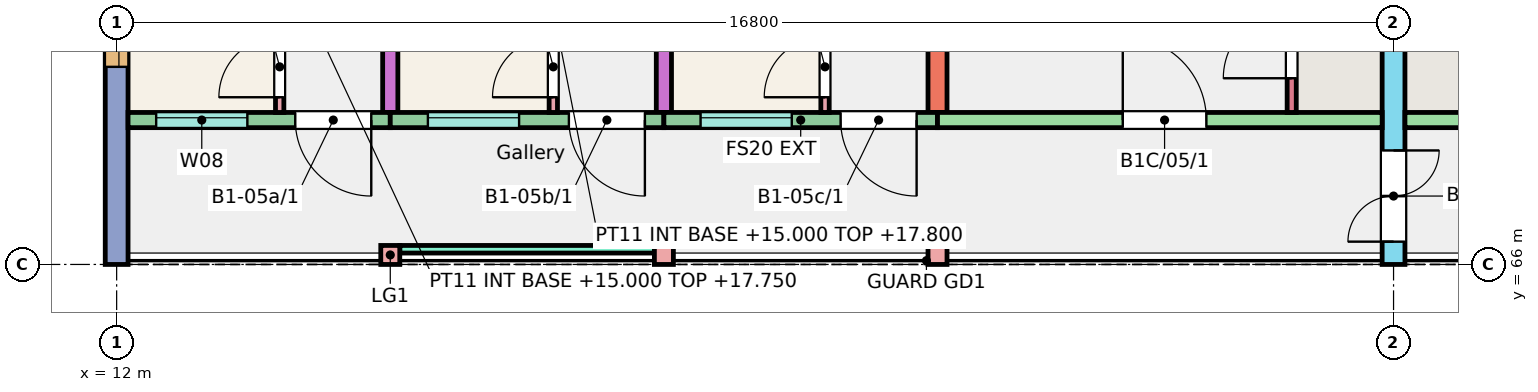
"""IFC4 building model, lengths in metres.
Left out: names, types, materials, properties, quantities, classifications, styles, units other than length and angle.
Written with IfcOpenShell. Run it as: python <this file> out.ifc"""

import sys

from ifc_helpers import new_model, si_unit, direction, frame, frame_2d, origin, origin_2d, place, context, subcontext, project, spatial, rectangle, extrude, element, fill, save


model = new_model("IFC4")
c1 = context("Model", 3, precision=1e-05, world=origin(), true_north=direction((0.0, 1.0)))
c2 = subcontext(c1, "Body", "Model", "MODEL_VIEW")
j1 = project(units=[si_unit("LENGTHUNIT", "METRE"), si_unit("PLANEANGLEUNIT", "RADIAN")], contexts=[c1])
p1 = place(None, origin())
s1 = spatial("IfcSite", under=j1, at=p1, CompositionType="ELEMENT")
p2 = place(p1, origin())
s2 = spatial("IfcBuilding", under=s1, at=p2, CompositionType="ELEMENT")
p3 = place(p2, frame((0.0, 0.0, 15.0)))
s3 = spatial("IfcBuildingStorey", under=s2, at=p3, CompositionType="ELEMENT", Elevation=15.0)
p4 = place(p3, frame((12.0, 66.0, 0.0), z_axis=(0.0, 0.0, 1.0), x_axis=(0.0, 1.0, 0.0)))
e1 = element("IfcWall", 1, at=p4, inside=s3, PredefinedType="SHEAR", context=c2, shape_type="SweptSolid", body=[
    extrude(rectangle(XDim=11.0, YDim=0.3, at=frame_2d((5.5, 0.0))), origin(), (0.0, 0.0, 1.0), 3.0),
])
p5 = place(p4, frame((2.6, 0.0, 0.9)))
e2 = element("IfcOpeningElement", 2, at=p5, cuts=e1, PredefinedType="OPENING", context=c2, shape_type="SweptSolid", body=[
    extrude(rectangle(XDim=1.2, YDim=1.5, at=frame_2d((0.6, 0.75))), frame((0.0, 0.16, 0.0), z_axis=(0.0, -1.0, 0.0), x_axis=(1.0, 0.0, 0.0)), (0.0, 0.0, 1.0), 0.32),
])
p6 = place(p4, frame((7.805, 0.0, 0.9)))
e3 = element("IfcOpeningElement", 3, at=p6, cuts=e1, PredefinedType="OPENING", context=c2, shape_type="SweptSolid", body=[
    extrude(rectangle(XDim=1.8, YDim=1.5, at=frame_2d((0.9, 0.75))), frame((0.0, 0.16, 0.0), z_axis=(0.0, -1.0, 0.0), x_axis=(1.0, 0.0, 0.0)), (0.0, 0.0, 1.0), 0.32),
])
for number, where, z_axis, x_axis in (
    (4, (15.6, 68.0, 0.0), (0.0, 0.0, 1.0), (0.0, 1.0, 0.0)),
    (5, (19.2, 68.0, 0.0), (0.0, 0.0, 1.0), (0.0, 1.0, 0.0)),
):
    element("IfcWall", number, at=place(p3, frame(where, z_axis=z_axis, x_axis=x_axis)), inside=s3, PredefinedType="SHEAR", context=c2, shape_type="SweptSolid", body=[
        extrude(rectangle(XDim=9.0, YDim=0.2, at=frame_2d((4.5, 0.0))), origin(), (0.0, 0.0, 1.0), 3.0),
    ])
p7 = place(p3, frame((22.8, 68.0, 0.0), z_axis=(0.0, 0.0, 1.0), x_axis=(0.0, 1.0, 0.0)))
e6 = element("IfcWall", 6, at=p7, inside=s3, PredefinedType="SHEAR", context=c2, shape_type="SweptSolid", body=[
    extrude(rectangle(XDim=9.0, YDim=0.25, at=frame_2d((4.5, 0.0))), origin(), (0.0, 0.0, 1.0), 3.0),
])
p8 = place(p3, frame((28.8, 66.0, 0.0), z_axis=(0.0, 0.0, 1.0), x_axis=(0.0, 1.0, 0.0)))
e7 = element("IfcWall", 7, at=p8, inside=s3, PredefinedType="SHEAR", context=c2, shape_type="SweptSolid", body=[
    extrude(rectangle(XDim=11.0, YDim=0.3, at=frame_2d((5.5, 0.0))), origin(), (0.0, 0.0, 1.0), 3.0),
])
p9 = place(p8, frame((0.3, 0.0, 0.0)))
e8 = element("IfcOpeningElement", 8, at=p9, cuts=e7, PredefinedType="OPENING", context=c2, shape_type="SweptSolid", body=[
    extrude(rectangle(XDim=1.2, YDim=2.1, at=frame_2d((0.6, 1.05))), frame((0.0, 0.16, 0.0), z_axis=(0.0, -1.0, 0.0), x_axis=(1.0, 0.0, 0.0)), (0.0, 0.0, 1.0), 0.32),
])
p10 = place(p3, frame((12.15, 67.9, 0.0), z_axis=(0.0, 0.0, 1.0), x_axis=(1.0, 0.0, 0.0)))
e9 = element("IfcWall", 9, at=p10, inside=s3, PredefinedType="SOLIDWALL", context=c2, shape_type="SweptSolid", body=[
    extrude(rectangle(XDim=3.45, YDim=0.2, at=frame_2d((1.725, 0.0))), origin(), (0.0, 0.0, 1.0), 3.0),
])
p11 = place(p10, frame((0.37, 0.0, 1.1)))
e10 = element("IfcOpeningElement", 10, at=p11, cuts=e9, PredefinedType="OPENING", context=c2, shape_type="SweptSolid", body=[
    extrude(rectangle(XDim=1.2, YDim=1.3, at=frame_2d((0.6, 0.65))), frame((0.0, 0.11, 0.0), z_axis=(0.0, -1.0, 0.0), x_axis=(1.0, 0.0, 0.0)), (0.0, 0.0, 1.0), 0.22),
])
p12 = place(p10, frame((2.2, 0.0, 0.0)))
e11 = element("IfcOpeningElement", 11, at=p12, cuts=e9, PredefinedType="OPENING", context=c2, shape_type="SweptSolid", body=[
    extrude(rectangle(XDim=1.0, YDim=2.1, at=frame_2d((0.5, 1.05))), frame((0.0, 0.11, 0.0), z_axis=(0.0, -1.0, 0.0), x_axis=(1.0, 0.0, 0.0)), (0.0, 0.0, 1.0), 0.22),
])
p13 = place(p3, frame((15.6, 67.9, 0.0), z_axis=(0.0, 0.0, 1.0), x_axis=(1.0, 0.0, 0.0)))
e12 = element("IfcWall", 12, at=p13, inside=s3, PredefinedType="SOLIDWALL", context=c2, shape_type="SweptSolid", body=[
    extrude(rectangle(XDim=3.6, YDim=0.2, at=frame_2d((1.8, 0.0))), origin(), (0.0, 0.0, 1.0), 3.0),
])
p14 = place(p13, frame((0.495, 0.0, 1.1)))
e13 = element("IfcOpeningElement", 13, at=p14, cuts=e12, PredefinedType="OPENING", context=c2, shape_type="SweptSolid", body=[
    extrude(rectangle(XDim=1.2, YDim=1.3, at=frame_2d((0.6, 0.65))), frame((0.0, 0.11, 0.0), z_axis=(0.0, -1.0, 0.0), x_axis=(1.0, 0.0, 0.0)), (0.0, 0.0, 1.0), 0.22),
])
p15 = place(p13, frame((2.35, 0.0, 0.0)))
e14 = element("IfcOpeningElement", 14, at=p15, cuts=e12, PredefinedType="OPENING", context=c2, shape_type="SweptSolid", body=[
    extrude(rectangle(XDim=1.0, YDim=2.1, at=frame_2d((0.5, 1.05))), frame((0.0, 0.11, 0.0), z_axis=(0.0, -1.0, 0.0), x_axis=(1.0, 0.0, 0.0)), (0.0, 0.0, 1.0), 0.22),
])
p16 = place(p3, frame((19.2, 67.9, 0.0), z_axis=(0.0, 0.0, 1.0), x_axis=(1.0, 0.0, 0.0)))
e15 = element("IfcWall", 15, at=p16, inside=s3, PredefinedType="SOLIDWALL", context=c2, shape_type="SweptSolid", body=[
    extrude(rectangle(XDim=3.6, YDim=0.2, at=frame_2d((1.8, 0.0))), origin(), (0.0, 0.0, 1.0), 3.0),
])
p17 = place(p16, frame((0.482, 0.0, 1.1)))
e16 = element("IfcOpeningElement", 16, at=p17, cuts=e15, PredefinedType="OPENING", context=c2, shape_type="SweptSolid", body=[
    extrude(rectangle(XDim=1.2, YDim=1.3, at=frame_2d((0.6, 0.65))), frame((0.0, 0.11, 0.0), z_axis=(0.0, -1.0, 0.0), x_axis=(1.0, 0.0, 0.0)), (0.0, 0.0, 1.0), 0.22),
])
p18 = place(p16, frame((2.325, 0.0, 0.0)))
e17 = element("IfcOpeningElement", 17, at=p18, cuts=e15, PredefinedType="OPENING", context=c2, shape_type="SweptSolid", body=[
    extrude(rectangle(XDim=1.0, YDim=2.1, at=frame_2d((0.5, 1.05))), frame((0.0, 0.11, 0.0), z_axis=(0.0, -1.0, 0.0), x_axis=(1.0, 0.0, 0.0)), (0.0, 0.0, 1.0), 0.22),
])
p19 = place(p3, frame((22.8, 67.9, 0.0), z_axis=(0.0, 0.0, 1.0), x_axis=(1.0, 0.0, 0.0)))
e18 = element("IfcWall", 18, at=p19, inside=s3, PredefinedType="SHEAR", context=c2, shape_type="SweptSolid", body=[
    extrude(rectangle(XDim=5.85, YDim=0.2, at=frame_2d((2.925, 0.0))), origin(), (0.0, 0.0, 1.0), 3.0),
])
p20 = place(p19, frame((2.438, 0.0, 0.0)))
e19 = element("IfcOpeningElement", 19, at=p20, cuts=e18, PredefinedType="OPENING", context=c2, shape_type="SweptSolid", body=[
    extrude(rectangle(XDim=1.1, YDim=2.1, at=frame_2d((0.55, 1.05))), frame((0.0, 0.11, 0.0), z_axis=(0.0, -1.0, 0.0), x_axis=(1.0, 0.0, 0.0)), (0.0, 0.0, 1.0), 0.22),
])
p21 = place(p3, frame((27.46, 68.0, 0.0), z_axis=(0.0, 0.0, 1.0), x_axis=(0.0, 1.0, 0.0)))
e20 = element("IfcWall", 20, at=p21, inside=s3, PredefinedType="SHEAR", context=c2, shape_type="SweptSolid", body=[
    extrude(rectangle(XDim=1.72, YDim=0.12, at=frame_2d((0.86, 0.0))), origin(), (0.0, 0.0, 1.0), 3.0),
])
p22 = place(p21, frame((0.45, 0.0, 0.0)))
e21 = element("IfcOpeningElement", 21, at=p22, cuts=e20, PredefinedType="OPENING", context=c2, shape_type="SweptSolid", body=[
    extrude(rectangle(XDim=0.9, YDim=2.1, at=frame_2d((0.45, 1.05))), frame((0.0, 0.07, 0.0), z_axis=(0.0, -1.0, 0.0), x_axis=(1.0, 0.0, 0.0)), (0.0, 0.0, 1.0), 0.14),
])
p23 = place(p3, frame((28.95, 67.9, 0.0), z_axis=(0.0, 0.0, 1.0), x_axis=(1.0, 0.0, 0.0)))
e22 = element("IfcWall", 22, at=p23, inside=s3, PredefinedType="SHEAR", context=c2, shape_type="SweptSolid", body=[
    extrude(rectangle(XDim=5.85, YDim=0.2, at=frame_2d((2.925, 0.0))), origin(), (0.0, 0.0, 1.0), 3.0),
])
p24 = place(p23, frame((2.312, 0.0, 0.0)))
e23 = element("IfcOpeningElement", 23, at=p24, cuts=e22, PredefinedType="OPENING", context=c2, shape_type="SweptSolid", body=[
    extrude(rectangle(XDim=1.1, YDim=2.1, at=frame_2d((0.55, 1.05))), frame((0.0, 0.11, 0.0), z_axis=(0.0, -1.0, 0.0), x_axis=(1.0, 0.0, 0.0)), (0.0, 0.0, 1.0), 0.22),
])
for number, where, z_axis, x_axis in (
    (24, (15.6, 66.125, 0.0), (0.0, 0.0, 1.0), (1.0, 0.0, 0.0)),
    (25, (19.2, 66.125, 0.0), (0.0, 0.0, 1.0), (1.0, 0.0, 0.0)),
    (26, (22.8, 66.125, 0.0), (0.0, 0.0, 1.0), (1.0, 0.0, 0.0)),
):
    element("IfcColumn", number, at=place(p3, frame(where, z_axis=z_axis, x_axis=x_axis)), inside=s3, PredefinedType="COLUMN", context=c2, shape_type="SweptSolid", body=[
        extrude(rectangle(XDim=0.25, YDim=0.25, at=origin_2d()), origin(), (0.0, 0.0, 1.0), 3.0),
    ])
p25 = place(p3, frame((15.725, 66.2, 0.0), z_axis=(0.0, 0.0, 1.0), x_axis=(1.0, 0.0, 0.0)))
e27 = element("IfcWall", 27, at=p25, inside=s3, PredefinedType="SOLIDWALL", context=c2, shape_type="SweptSolid", body=[
    extrude(rectangle(XDim=3.35, YDim=0.1, at=frame_2d((1.675, 0.0))), origin(), (0.0, 0.0, 1.0), 2.45),
])
p26 = place(p3, frame((14.145, 68.0, 0.0), z_axis=(0.0, 0.0, 1.0), x_axis=(0.0, 1.0, 0.0)))
e28 = element("IfcWall", 28, at=p26, inside=s3, PredefinedType="PARTITIONING", context=c2, shape_type="SweptSolid", body=[
    extrude(rectangle(XDim=4.3, YDim=0.11, at=frame_2d((2.15, 0.0))), origin(), (0.0, 0.0, 1.0), 2.75),
])
p27 = place(p26, frame((0.2, 0.0, 0.0)))
e29 = element("IfcOpeningElement", 29, at=p27, cuts=e28, PredefinedType="OPENING", context=c2, shape_type="SweptSolid", body=[
    extrude(rectangle(XDim=0.8, YDim=2.1, at=frame_2d((0.4, 1.05))), frame((0.0, 0.065, 0.0), z_axis=(0.0, -1.0, 0.0), x_axis=(1.0, 0.0, 0.0)), (0.0, 0.0, 1.0), 0.13),
])
p28 = place(p26, frame((3.35, 0.0, 0.0)))
e30 = element("IfcOpeningElement", 30, at=p28, cuts=e28, PredefinedType="OPENING", context=c2, shape_type="SweptSolid", body=[
    extrude(rectangle(XDim=0.8, YDim=2.1, at=frame_2d((0.4, 1.05))), frame((0.0, 0.065, 0.0), z_axis=(0.0, -1.0, 0.0), x_axis=(1.0, 0.0, 0.0)), (0.0, 0.0, 1.0), 0.13),
])
p29 = place(p3, frame((17.745, 68.0, 0.0), z_axis=(0.0, 0.0, 1.0), x_axis=(0.0, 1.0, 0.0)))
e31 = element("IfcWall", 31, at=p29, inside=s3, PredefinedType="PARTITIONING", context=c2, shape_type="SweptSolid", body=[
    extrude(rectangle(XDim=4.5, YDim=0.11, at=frame_2d((2.25, 0.0))), origin(), (0.0, 0.0, 1.0), 2.8),
])
p30 = place(p29, frame((0.2, 0.0, 0.0)))
e32 = element("IfcOpeningElement", 32, at=p30, cuts=e31, PredefinedType="OPENING", context=c2, shape_type="SweptSolid", body=[
    extrude(rectangle(XDim=0.8, YDim=2.1, at=frame_2d((0.4, 1.05))), frame((0.0, 0.065, 0.0), z_axis=(0.0, -1.0, 0.0), x_axis=(1.0, 0.0, 0.0)), (0.0, 0.0, 1.0), 0.13),
])
p31 = place(p29, frame((3.55, 0.0, 0.0)))
e33 = element("IfcOpeningElement", 33, at=p31, cuts=e31, PredefinedType="OPENING", context=c2, shape_type="SweptSolid", body=[
    extrude(rectangle(XDim=0.8, YDim=2.1, at=frame_2d((0.4, 1.05))), frame((0.0, 0.065, 0.0), z_axis=(0.0, -1.0, 0.0), x_axis=(1.0, 0.0, 0.0)), (0.0, 0.0, 1.0), 0.13),
])
p32 = place(p3, frame((21.32, 68.0, 0.0), z_axis=(0.0, 0.0, 1.0), x_axis=(0.0, 1.0, 0.0)))
e34 = element("IfcWall", 34, at=p32, inside=s3, PredefinedType="PARTITIONING", context=c2, shape_type="SweptSolid", body=[
    extrude(rectangle(XDim=4.7, YDim=0.11, at=frame_2d((2.35, 0.0))), origin(), (0.0, 0.0, 1.0), 2.8),
])
p33 = place(p32, frame((0.2, 0.0, 0.0)))
e35 = element("IfcOpeningElement", 35, at=p33, cuts=e34, PredefinedType="OPENING", context=c2, shape_type="SweptSolid", body=[
    extrude(rectangle(XDim=0.8, YDim=2.1, at=frame_2d((0.4, 1.05))), frame((0.0, 0.065, 0.0), z_axis=(0.0, -1.0, 0.0), x_axis=(1.0, 0.0, 0.0)), (0.0, 0.0, 1.0), 0.13),
])
p34 = place(p32, frame((3.75, 0.0, 0.0)))
e36 = element("IfcOpeningElement", 36, at=p34, cuts=e34, PredefinedType="OPENING", context=c2, shape_type="SweptSolid", body=[
    extrude(rectangle(XDim=0.8, YDim=2.1, at=frame_2d((0.4, 1.05))), frame((0.0, 0.065, 0.0), z_axis=(0.0, -1.0, 0.0), x_axis=(1.0, 0.0, 0.0)), (0.0, 0.0, 1.0), 0.13),
])
p35 = place(p11, origin())
e37 = element("IfcWindow", 37, at=p35, inside=s3, PartitioningType="SINGLE_PANEL", PredefinedType="WINDOW", context=c2, shape_type="SweptSolid", body=[
    extrude(rectangle(XDim=1.2, YDim=1.3, at=frame_2d((0.6, 0.65))), frame((0.0, 0.06, 0.0), z_axis=(0.0, -1.0, 0.0), x_axis=(1.0, 0.0, 0.0)), (0.0, 0.0, 1.0), 0.06),
])
fill(e10, e37)
p36 = place(p5, origin())
e38 = element("IfcWindow", 38, at=p36, inside=s3, PartitioningType="SINGLE_PANEL", PredefinedType="WINDOW", context=c2, shape_type="SweptSolid", body=[
    extrude(rectangle(XDim=1.2, YDim=1.5, at=frame_2d((0.6, 0.75))), frame((0.0, 0.0, 0.0), z_axis=(0.0, -1.0, 0.0), x_axis=(1.0, 0.0, 0.0)), (0.0, 0.0, 1.0), 0.06),
])
fill(e2, e38)
p37 = place(p14, origin())
e39 = element("IfcWindow", 39, at=p37, inside=s3, PartitioningType="SINGLE_PANEL", PredefinedType="WINDOW", context=c2, shape_type="SweptSolid", body=[
    extrude(rectangle(XDim=1.2, YDim=1.3, at=frame_2d((0.6, 0.65))), frame((0.0, 0.06, 0.0), z_axis=(0.0, -1.0, 0.0), x_axis=(1.0, 0.0, 0.0)), (0.0, 0.0, 1.0), 0.06),
])
fill(e13, e39)
p38 = place(p17, origin())
e40 = element("IfcWindow", 40, at=p38, inside=s3, PartitioningType="SINGLE_PANEL", PredefinedType="WINDOW", context=c2, shape_type="SweptSolid", body=[
    extrude(rectangle(XDim=1.2, YDim=1.3, at=frame_2d((0.6, 0.65))), frame((0.0, 0.06, 0.0), z_axis=(0.0, -1.0, 0.0), x_axis=(1.0, 0.0, 0.0)), (0.0, 0.0, 1.0), 0.06),
])
fill(e16, e40)
p39 = place(p12, origin())
e41 = element("IfcDoor", 41, at=p39, inside=s3, OperationType="SINGLE_SWING_RIGHT", PredefinedType="DOOR", context=c2, shape_type="SweptSolid", body=[
    extrude(rectangle(XDim=1.0, YDim=2.1, at=frame_2d((0.5, 1.05))), frame((0.0, 0.025, 0.0), z_axis=(0.0, -1.0, 0.0), x_axis=(1.0, 0.0, 0.0)), (0.0, 0.0, 1.0), 0.05),
])
fill(e11, e41)
p40 = place(p27, origin())
e42 = element("IfcDoor", 42, at=p40, inside=s3, OperationType="SINGLE_SWING_LEFT", PredefinedType="DOOR", context=c2, shape_type="SweptSolid", body=[
    extrude(rectangle(XDim=0.8, YDim=2.1, at=frame_2d((0.4, 1.05))), frame((0.0, 0.025, 0.0), z_axis=(0.0, -1.0, 0.0), x_axis=(1.0, 0.0, 0.0)), (0.0, 0.0, 1.0), 0.05),
])
fill(e29, e42)
p41 = place(p15, origin())
e43 = element("IfcDoor", 43, at=p41, inside=s3, OperationType="SINGLE_SWING_RIGHT", PredefinedType="DOOR", context=c2, shape_type="SweptSolid", body=[
    extrude(rectangle(XDim=1.0, YDim=2.1, at=frame_2d((0.5, 1.05))), frame((0.0, 0.025, 0.0), z_axis=(0.0, -1.0, 0.0), x_axis=(1.0, 0.0, 0.0)), (0.0, 0.0, 1.0), 0.05),
])
fill(e14, e43)
p42 = place(p30, origin())
e44 = element("IfcDoor", 44, at=p42, inside=s3, OperationType="SINGLE_SWING_LEFT", PredefinedType="DOOR", context=c2, shape_type="SweptSolid", body=[
    extrude(rectangle(XDim=0.8, YDim=2.1, at=frame_2d((0.4, 1.05))), frame((0.0, 0.025, 0.0), z_axis=(0.0, -1.0, 0.0), x_axis=(1.0, 0.0, 0.0)), (0.0, 0.0, 1.0), 0.05),
])
fill(e32, e44)
p43 = place(p18, origin())
e45 = element("IfcDoor", 45, at=p43, inside=s3, OperationType="SINGLE_SWING_RIGHT", PredefinedType="DOOR", context=c2, shape_type="SweptSolid", body=[
    extrude(rectangle(XDim=1.0, YDim=2.1, at=frame_2d((0.5, 1.05))), frame((0.0, 0.025, 0.0), z_axis=(0.0, -1.0, 0.0), x_axis=(1.0, 0.0, 0.0)), (0.0, 0.0, 1.0), 0.05),
])
fill(e17, e45)
p44 = place(p33, origin())
e46 = element("IfcDoor", 46, at=p44, inside=s3, OperationType="SINGLE_SWING_LEFT", PredefinedType="DOOR", context=c2, shape_type="SweptSolid", body=[
    extrude(rectangle(XDim=0.8, YDim=2.1, at=frame_2d((0.4, 1.05))), frame((0.0, 0.025, 0.0), z_axis=(0.0, -1.0, 0.0), x_axis=(1.0, 0.0, 0.0)), (0.0, 0.0, 1.0), 0.05),
])
fill(e35, e46)
p45 = place(p20, origin())
e47 = element("IfcDoor", 47, at=p45, inside=s3, OperationType="SINGLE_SWING_LEFT", PredefinedType="DOOR", context=c2, shape_type="SweptSolid", body=[
    extrude(rectangle(XDim=1.1, YDim=2.1, at=frame_2d((0.55, 1.05))), frame((0.0, 0.025, 0.0), z_axis=(0.0, -1.0, 0.0), x_axis=(1.0, 0.0, 0.0)), (0.0, 0.0, 1.0), 0.05),
])
fill(e19, e47)
p46 = place(p22, origin())
e48 = element("IfcDoor", 48, at=p46, inside=s3, OperationType="SINGLE_SWING_LEFT", PredefinedType="DOOR", context=c2, shape_type="SweptSolid", body=[
    extrude(rectangle(XDim=0.9, YDim=2.1, at=frame_2d((0.45, 1.05))), frame((0.0, 0.025, 0.0), z_axis=(0.0, -1.0, 0.0), x_axis=(1.0, 0.0, 0.0)), (0.0, 0.0, 1.0), 0.05),
])
fill(e21, e48)
p47 = place(p9, origin())
e49 = element("IfcDoor", 49, at=p47, inside=s3, OperationType="DOUBLE_DOOR_SINGLE_SWING", PredefinedType="DOOR", context=c2, shape_type="SweptSolid", body=[
    extrude(rectangle(XDim=1.2, YDim=2.1, at=frame_2d((0.6, 1.05))), frame((0.0, 0.025, 0.0), z_axis=(0.0, -1.0, 0.0), x_axis=(1.0, 0.0, 0.0)), (0.0, 0.0, 1.0), 0.05),
])
fill(e8, e49)
save(model, sys.argv[1])
